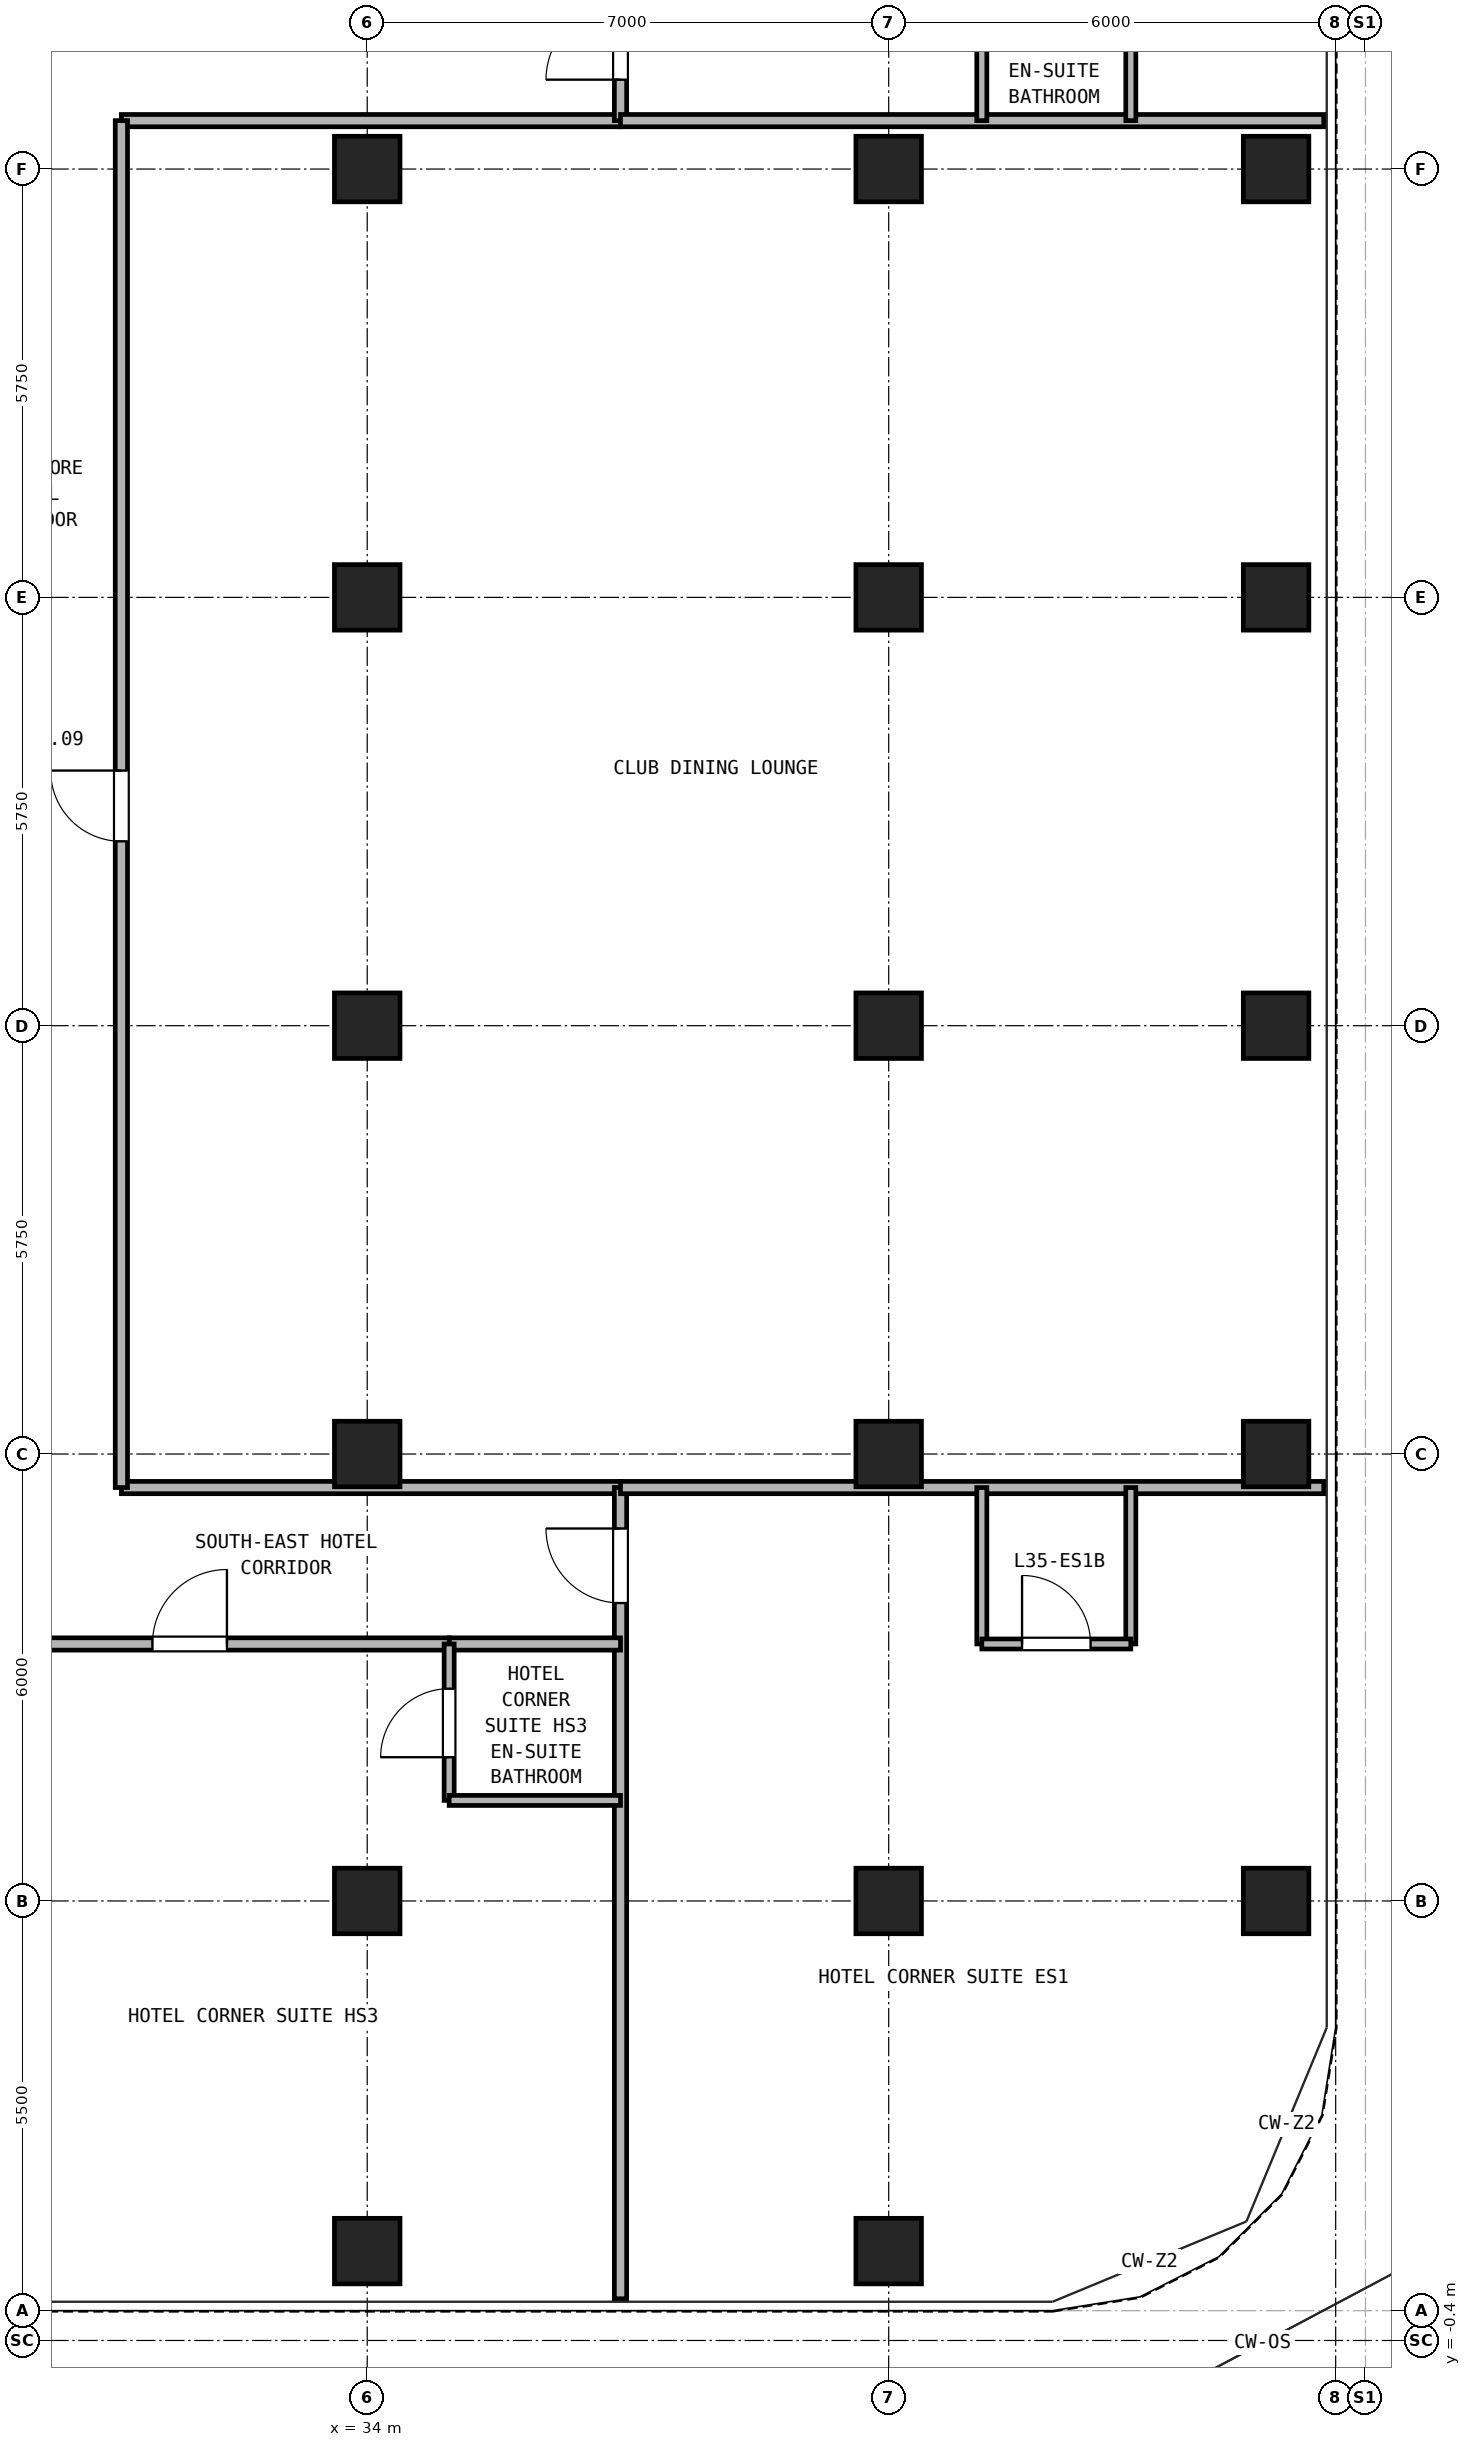
"""IFC4 building model, lengths in metres.
Left out: names, types, materials, properties, quantities, classifications, styles, units other than length and angle.
Written with IfcOpenShell. Run it as: python <this file> out.ifc"""

import sys

from ifc_helpers import new_model, si_unit, direction, frame, frame_2d, origin, origin_2d, place, context, subcontext, project, spatial, rectangle, hollow_rectangle, extrude, source, transform, mapped, element, fill, save


model = new_model("IFC4")
c1 = context("Model", 3, precision=1e-05, world=origin(), true_north=direction((0.0, 1.0)))
c2 = subcontext(c1, "Body", "Model", "MODEL_VIEW")
j1 = project(units=[si_unit("LENGTHUNIT", "METRE"), si_unit("PLANEANGLEUNIT", "RADIAN")], contexts=[c1])
p1 = place(None, origin())
s1 = spatial("IfcSite", under=j1, at=p1, CompositionType="ELEMENT")
p2 = place(p1, origin())
s2 = spatial("IfcBuilding", under=s1, at=p2, CompositionType="ELEMENT")
p3 = place(p2, frame((0.0, 0.0, 127.9)))
s3 = spatial("IfcBuildingStorey", under=s2, at=p3, CompositionType="ELEMENT", Elevation=127.9)
m1 = source(origin(), c2, "Body", "SweptSolid", [
    extrude(hollow_rectangle(XDim=0.88, YDim=0.88, WallThickness=0.05, at=origin_2d()), origin(), (0.0, 0.0, 1.0), 2.95),
])
for number, where, z_axis, x_axis in (
    (1, (34.0, 0.8, 0.0), (0.0, 0.0, 1.0), (1.0, 0.0, 0.0)),
    (2, (41.0, 0.8, 0.0), (0.0, 0.0, 1.0), (1.0, 0.0, 0.0)),
    (3, (46.2, 5.5, 0.0), (0.0, 0.0, 1.0), (1.0, 0.0, 0.0)),
    (4, (46.2, 11.5, 0.0), (0.0, 0.0, 1.0), (1.0, 0.0, 0.0)),
    (5, (46.2, 17.25, 0.0), (0.0, 0.0, 1.0), (1.0, 0.0, 0.0)),
    (6, (46.2, 23.0, 0.0), (0.0, 0.0, 1.0), (1.0, 0.0, 0.0)),
    (7, (46.2, 28.75, 0.0), (0.0, 0.0, 1.0), (1.0, 0.0, 0.0)),
    (8, (34.0, 5.5, 0.0), (0.0, 0.0, 1.0), (1.0, 0.0, 0.0)),
    (9, (34.0, 11.5, 0.0), (0.0, 0.0, 1.0), (1.0, 0.0, 0.0)),
    (10, (34.0, 17.25, 0.0), (0.0, 0.0, 1.0), (1.0, 0.0, 0.0)),
    (11, (34.0, 23.0, 0.0), (0.0, 0.0, 1.0), (1.0, 0.0, 0.0)),
    (12, (34.0, 28.75, 0.0), (0.0, 0.0, 1.0), (1.0, 0.0, 0.0)),
    (13, (41.0, 5.5, 0.0), (0.0, 0.0, 1.0), (1.0, 0.0, 0.0)),
    (14, (41.0, 11.5, 0.0), (0.0, 0.0, 1.0), (1.0, 0.0, 0.0)),
    (15, (41.0, 17.25, 0.0), (0.0, 0.0, 1.0), (1.0, 0.0, 0.0)),
    (16, (41.0, 23.0, 0.0), (0.0, 0.0, 1.0), (1.0, 0.0, 0.0)),
    (17, (41.0, 28.75, 0.0), (0.0, 0.0, 1.0), (1.0, 0.0, 0.0)),
):
    element("IfcColumn", number, at=place(p3, frame(where, z_axis=z_axis, x_axis=x_axis)), inside=s3, PredefinedType="COLUMN", context=c2, shape_type="MappedRepresentation", body=[
        mapped(m1, transform((0.0, 0.0, 0.0), x_axis=(1.0, 0.0, 0.0), y_axis=(0.0, 1.0, 0.0), z_axis=(0.0, 0.0, 1.0), scale=1.0)),
    ])
for number, where, z_axis, x_axis in (
    (18, (30.7, 11.05, 0.0), (0.0, 0.0, 1.0), (1.0, 0.0, 0.0)),
    (19, (30.7, 29.4, 0.0), (0.0, 0.0, 1.0), (1.0, 0.0, 0.0)),
):
    element("IfcWall", number, at=place(p3, frame(where, z_axis=z_axis, x_axis=x_axis)), inside=s3, PredefinedType="PARTITIONING", context=c2, shape_type="SweptSolid", body=[
        extrude(rectangle(XDim=6.7, YDim=0.165, at=frame_2d((3.35, 0.0))), origin(), (0.0, 0.0, 1.0), 2.95),
    ])
p4 = place(p3, frame((30.7, 11.05, 0.0), z_axis=(0.0, 0.0, 1.0), x_axis=(0.0, 1.0, 0.0)))
e20 = element("IfcWall", 20, at=p4, inside=s3, PredefinedType="PARTITIONING", context=c2, shape_type="SweptSolid", body=[
    extrude(rectangle(XDim=18.35, YDim=0.165, at=frame_2d((9.175, 0.0))), origin(), (0.0, 0.0, 1.0), 2.95),
])
p5 = place(p4, frame((8.675, 0.0, 0.0)))
e21 = element("IfcOpeningElement", 21, at=p5, cuts=e20, PredefinedType="OPENING", context=c2, shape_type="SweptSolid", body=[
    extrude(rectangle(XDim=0.95, YDim=2.15, at=frame_2d((0.475, 1.075))), frame((0.0, 0.093, 0.0), z_axis=(0.0, -1.0, 0.0), x_axis=(1.0, 0.0, 0.0)), (0.0, 0.0, 1.0), 0.185),
])
p6 = place(p3, frame((37.4, 0.16, 0.0), z_axis=(0.0, 0.0, 1.0), x_axis=(0.0, 1.0, 0.0)))
e22 = element("IfcWall", 22, at=p6, inside=s3, PredefinedType="PARTITIONING", context=c2, shape_type="SweptSolid", body=[
    extrude(rectangle(XDim=10.89, YDim=0.165, at=frame_2d((5.445, 0.0))), origin(), (0.0, 0.0, 1.0), 2.95),
])
p7 = place(p6, frame((9.34, 0.0, 0.0)))
e23 = element("IfcOpeningElement", 23, at=p7, cuts=e22, PredefinedType="OPENING", context=c2, shape_type="SweptSolid", body=[
    extrude(rectangle(XDim=1.0, YDim=2.15, at=frame_2d((0.5, 1.075))), frame((0.0, 0.093, 0.0), z_axis=(0.0, -1.0, 0.0), x_axis=(1.0, 0.0, 0.0)), (0.0, 0.0, 1.0), 0.185),
])
p8 = place(p3, frame((37.4, 29.4, 0.0), z_axis=(0.0, 0.0, 1.0), x_axis=(0.0, 1.0, 0.0)))
e24 = element("IfcWall", 24, at=p8, inside=s3, PredefinedType="PARTITIONING", context=c2, shape_type="SweptSolid", body=[
    extrude(rectangle(XDim=5.74, YDim=0.165, at=frame_2d((2.87, 0.0))), origin(), (0.0, 0.0, 1.0), 2.95),
])
p9 = place(p8, frame((0.55, 0.0, 0.0)))
e25 = element("IfcOpeningElement", 25, at=p9, cuts=e24, PredefinedType="OPENING", context=c2, shape_type="SweptSolid", body=[
    extrude(rectangle(XDim=1.0, YDim=2.15, at=frame_2d((0.5, 1.075))), frame((0.0, 0.093, 0.0), z_axis=(0.0, -1.0, 0.0), x_axis=(1.0, 0.0, 0.0)), (0.0, 0.0, 1.0), 0.185),
])
for number, where, z_axis, x_axis in (
    (26, (37.4, 11.05, 0.0), (0.0, 0.0, 1.0), (1.0, 0.0, 0.0)),
    (27, (37.4, 29.4, 0.0), (0.0, 0.0, 1.0), (1.0, 0.0, 0.0)),
):
    element("IfcWall", number, at=place(p3, frame(where, z_axis=z_axis, x_axis=x_axis)), inside=s3, PredefinedType="PARTITIONING", context=c2, shape_type="SweptSolid", body=[
        extrude(rectangle(XDim=9.44, YDim=0.165, at=frame_2d((4.72, 0.0))), origin(), (0.0, 0.0, 1.0), 2.95),
    ])
for number, where, z_axis, x_axis in (
    (28, (42.25, 8.95, 0.0), (0.0, 0.0, 1.0), (0.0, 1.0, 0.0)),
    (29, (44.25, 8.95, 0.0), (0.0, 0.0, 1.0), (0.0, 1.0, 0.0)),
):
    element("IfcWall", number, at=place(p3, frame(where, z_axis=z_axis, x_axis=x_axis)), inside=s3, PredefinedType="PARTITIONING", context=c2, shape_type="SweptSolid", body=[
        extrude(rectangle(XDim=2.1, YDim=0.135, at=frame_2d((1.05, 0.0))), origin(), (0.0, 0.0, 1.0), 2.95),
    ])
p10 = place(p3, frame((42.25, 8.95, 0.0), z_axis=(0.0, 0.0, 1.0), x_axis=(1.0, 0.0, 0.0)))
e30 = element("IfcWall", 30, at=p10, inside=s3, PredefinedType="PARTITIONING", context=c2, shape_type="SweptSolid", body=[
    extrude(rectangle(XDim=2.0, YDim=0.135, at=frame_2d((1.0, 0.0))), origin(), (0.0, 0.0, 1.0), 2.95),
])
p11 = place(p10, frame((0.54, 0.0, 0.0)))
e31 = element("IfcOpeningElement", 31, at=p11, cuts=e30, PredefinedType="OPENING", context=c2, shape_type="SweptSolid", body=[
    extrude(rectangle(XDim=0.92, YDim=2.1, at=frame_2d((0.46, 1.05))), frame((0.0, 0.077, 0.0), z_axis=(0.0, -1.0, 0.0), x_axis=(1.0, 0.0, 0.0)), (0.0, 0.0, 1.0), 0.155),
])
for number, where, z_axis, x_axis in (
    (32, (42.25, 29.4, 0.0), (0.0, 0.0, 1.0), (0.0, 1.0, 0.0)),
    (33, (44.25, 29.4, 0.0), (0.0, 0.0, 1.0), (0.0, 1.0, 0.0)),
):
    element("IfcWall", number, at=place(p3, frame(where, z_axis=z_axis, x_axis=x_axis)), inside=s3, PredefinedType="PARTITIONING", context=c2, shape_type="SweptSolid", body=[
        extrude(rectangle(XDim=2.1, YDim=0.135, at=frame_2d((1.05, 0.0))), origin(), (0.0, 0.0, 1.0), 2.95),
    ])
p12 = place(p3, frame((35.1, 8.95, 0.0), z_axis=(0.0, 0.0, 1.0), x_axis=(1.0, 0.0, 0.0)))
e34 = element("IfcWall", 34, at=p12, inside=s3, PredefinedType="PARTITIONING", context=c2, shape_type="SweptSolid", body=[
    extrude(rectangle(XDim=2.3, YDim=0.165, at=frame_2d((1.15, 0.0))), origin(), (0.0, 0.0, 1.0), 2.95),
])
p13 = place(p3, frame((28.133, 8.95, 0.0), z_axis=(0.0, 0.0, 1.0), x_axis=(1.0, 0.0, 0.0)))
e35 = element("IfcWall", 35, at=p13, inside=s3, PredefinedType="PARTITIONING", context=c2, shape_type="SweptSolid", body=[
    extrude(rectangle(XDim=6.967, YDim=0.165, at=frame_2d((3.483, 0.0))), origin(), (0.0, 0.0, 1.0), 2.95),
])
p14 = place(p13, frame((2.984, 0.0, 0.0)))
e36 = element("IfcOpeningElement", 36, at=p14, cuts=e35, PredefinedType="OPENING", context=c2, shape_type="SweptSolid", body=[
    extrude(rectangle(XDim=1.0, YDim=2.15, at=frame_2d((0.5, 1.075))), frame((0.0, 0.093, 0.0), z_axis=(0.0, -1.0, 0.0), x_axis=(1.0, 0.0, 0.0)), (0.0, 0.0, 1.0), 0.185),
])
p15 = place(p3, frame((35.1, 6.85, 0.0), z_axis=(0.0, 0.0, 1.0), x_axis=(0.0, 1.0, 0.0)))
e37 = element("IfcWall", 37, at=p15, inside=s3, PredefinedType="PARTITIONING", context=c2, shape_type="SweptSolid", body=[
    extrude(rectangle(XDim=2.1, YDim=0.135, at=frame_2d((1.05, 0.0))), origin(), (0.0, 0.0, 1.0), 2.95),
])
p16 = place(p15, frame((0.58, 0.0, 0.0)))
e38 = element("IfcOpeningElement", 38, at=p16, cuts=e37, PredefinedType="OPENING", context=c2, shape_type="SweptSolid", body=[
    extrude(rectangle(XDim=0.92, YDim=2.1, at=frame_2d((0.46, 1.05))), frame((0.0, 0.077, 0.0), z_axis=(0.0, -1.0, 0.0), x_axis=(1.0, 0.0, 0.0)), (0.0, 0.0, 1.0), 0.155),
])
p17 = place(p3, frame((35.1, 6.85, 0.0), z_axis=(0.0, 0.0, 1.0), x_axis=(1.0, 0.0, 0.0)))
e39 = element("IfcWall", 39, at=p17, inside=s3, PredefinedType="PARTITIONING", context=c2, shape_type="SweptSolid", body=[
    extrude(rectangle(XDim=2.3, YDim=0.135, at=frame_2d((1.15, 0.0))), origin(), (0.0, 0.0, 1.0), 2.95),
])
p18 = place(p11, origin())
e40 = element("IfcDoor", 40, at=p18, inside=s3, OperationType="SINGLE_SWING_LEFT", PredefinedType="DOOR", context=c2, shape_type="SweptSolid", body=[
    extrude(rectangle(XDim=0.92, YDim=2.1, at=frame_2d((0.46, 1.05))), frame((0.0, 0.025, 0.0), z_axis=(0.0, -1.0, 0.0), x_axis=(1.0, 0.0, 0.0)), (0.0, 0.0, 1.0), 0.05),
])
fill(e31, e40)
p19 = place(p7, frame((1.0, 0.0, 0.0), z_axis=(0.0, 0.0, 1.0), x_axis=(-1.0, 0.0, 0.0)))
e41 = element("IfcDoor", 41, at=p19, inside=s3, OperationType="SINGLE_SWING_RIGHT", PredefinedType="DOOR", context=c2, shape_type="SweptSolid", body=[
    extrude(rectangle(XDim=1.0, YDim=2.15, at=frame_2d((0.5, 1.075))), frame((0.0, 0.025, 0.0), z_axis=(0.0, -1.0, 0.0), x_axis=(1.0, 0.0, 0.0)), (0.0, 0.0, 1.0), 0.05),
])
fill(e23, e41)
p20 = place(p9, frame((1.0, 0.0, 0.0), z_axis=(0.0, 0.0, 1.0), x_axis=(-1.0, 0.0, 0.0)))
e42 = element("IfcDoor", 42, at=p20, inside=s3, OperationType="SINGLE_SWING_LEFT", PredefinedType="DOOR", context=c2, shape_type="SweptSolid", body=[
    extrude(rectangle(XDim=1.0, YDim=2.15, at=frame_2d((0.5, 1.075))), frame((0.0, 0.025, 0.0), z_axis=(0.0, -1.0, 0.0), x_axis=(1.0, 0.0, 0.0)), (0.0, 0.0, 1.0), 0.05),
])
fill(e25, e42)
p21 = place(p16, origin())
e43 = element("IfcDoor", 43, at=p21, inside=s3, OperationType="SINGLE_SWING_LEFT", PredefinedType="DOOR", context=c2, shape_type="SweptSolid", body=[
    extrude(rectangle(XDim=0.92, YDim=2.1, at=frame_2d((0.46, 1.05))), frame((0.0, 0.025, 0.0), z_axis=(0.0, -1.0, 0.0), x_axis=(1.0, 0.0, 0.0)), (0.0, 0.0, 1.0), 0.05),
])
fill(e38, e43)
p22 = place(p14, frame((1.0, 0.0, 0.0), z_axis=(0.0, 0.0, 1.0), x_axis=(-1.0, 0.0, 0.0)))
e44 = element("IfcDoor", 44, at=p22, inside=s3, OperationType="SINGLE_SWING_RIGHT", PredefinedType="DOOR", context=c2, shape_type="SweptSolid", body=[
    extrude(rectangle(XDim=1.0, YDim=2.15, at=frame_2d((0.5, 1.075))), frame((0.0, 0.025, 0.0), z_axis=(0.0, -1.0, 0.0), x_axis=(1.0, 0.0, 0.0)), (0.0, 0.0, 1.0), 0.05),
])
fill(e36, e44)
p23 = place(p5, origin())
e45 = element("IfcDoor", 45, at=p23, inside=s3, OperationType="SINGLE_SWING_RIGHT", PredefinedType="DOOR", context=c2, shape_type="SweptSolid", body=[
    extrude(rectangle(XDim=0.95, YDim=2.15, at=frame_2d((0.475, 1.075))), frame((0.0, 0.025, 0.0), z_axis=(0.0, -1.0, 0.0), x_axis=(1.0, 0.0, 0.0)), (0.0, 0.0, 1.0), 0.05),
])
fill(e21, e45)
save(model, sys.argv[1])
